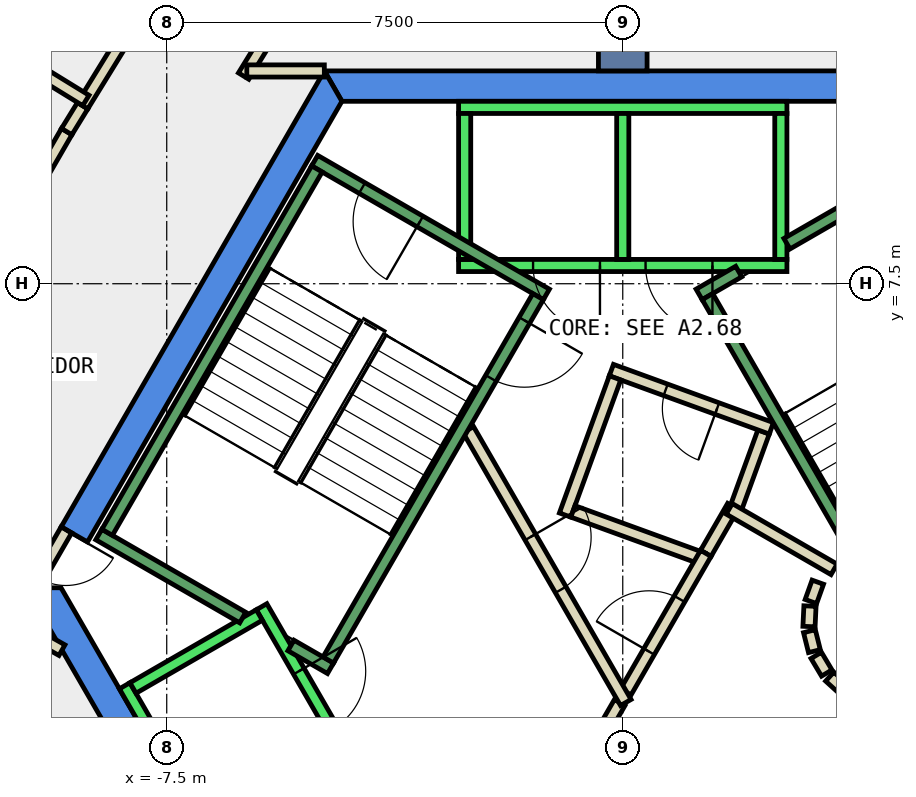
"""IFC4 building model, lengths in metres.
Left out: names, types, materials, properties, quantities, classifications, styles, units other than length and angle.
Written with IfcOpenShell. Run it as: python <this file> out.ifc"""

import sys

from ifc_helpers import new_model, si_unit, direction, frame, frame_2d, origin, place, context, subcontext, project, spatial, polyline, rectangle, outline, extrude, element, fill, save


model = new_model("IFC4")
c1 = context("Model", 3, precision=1e-05, world=origin(), true_north=direction((0.0, 1.0)))
c2 = subcontext(c1, "Body", "Model", "MODEL_VIEW")
j1 = project(units=[si_unit("LENGTHUNIT", "METRE"), si_unit("PLANEANGLEUNIT", "RADIAN")], contexts=[c1])
p1 = place(None, origin())
s1 = spatial("IfcSite", under=j1, at=p1, CompositionType="ELEMENT")
p2 = place(p1, origin())
s2 = spatial("IfcBuilding", under=s1, at=p2, CompositionType="ELEMENT")
p3 = place(p2, frame((0.0, 0.0, 322.4)))
s3 = spatial("IfcBuildingStorey", under=s2, at=p3, CompositionType="ELEMENT", Elevation=322.4)
p4 = place(p3, frame((0.0, 0.0, -0.34)))
e1 = element("IfcWall", 1, at=p4, inside=s3, PredefinedType="SHEAR", context=c2, shape_type="SweptSolid", body=[
    extrude(outline(polyline([(4.907, 11.0), (-4.907, 11.0), (-4.619, 10.5), (4.619, 10.5), (4.907, 11.0)])), origin(), (0.0, 0.0, 1.0), 3.34),
])
p5 = place(p3, frame((0.0, 0.0, -0.34)))
e2 = element("IfcWall", 2, at=p5, inside=s3, PredefinedType="SHEAR", context=c2, shape_type="SweptSolid", body=[
    extrude(outline(polyline([(-9.236, 3.502), (-8.803, 3.253), (-4.619, 10.5), (-4.907, 11.0), (-9.236, 3.502)])), origin(), (0.0, 0.0, 1.0), 3.34),
])
p6 = place(p3, frame((0.0, 0.0, -0.34)))
e3 = element("IfcWall", 3, at=p6, inside=s3, PredefinedType="SHEAR", context=c2, shape_type="SweptSolid", body=[
    extrude(outline(polyline([(-9.815, 2.5), (-4.907, -6.0), (-4.619, -5.5), (-9.238, 2.5), (-9.815, 2.5)])), origin(), (0.0, 0.0, 1.0), 3.34),
])
p7 = place(p3, frame((0.0, 11.0, -0.34), z_axis=(0.0, 0.0, 1.0), x_axis=(0.0, 1.0, 0.0)))
e4 = element("IfcWall", 4, at=p7, inside=s3, PredefinedType="SHEAR", context=c2, shape_type="SweptSolid", body=[
    extrude(rectangle(XDim=9.0, YDim=0.8, at=frame_2d((4.5, 0.0))), origin(), (0.0, 0.0, 1.0), 3.34),
])
p8 = place(p3, frame((1.366, 3.066, 0.0), z_axis=(0.0, 0.0, 1.0), x_axis=(0.499698775601, 0.866199245938, 0.0)))
e5 = element("IfcWall", 5, at=p8, inside=s3, PredefinedType="PARTITIONING", context=c2, shape_type="SweptSolid", body=[
    extrude(rectangle(XDim=0.893, YDim=0.2, at=frame_2d((0.446, 0.0))), origin(), (0.0, 0.0, 1.0), 3.0),
])
p9 = place(p3, frame((1.838, 3.748, 0.0), z_axis=(0.0, 0.0, 1.0), x_axis=(0.341883255813, 0.939742432475, 0.0)))
e6 = element("IfcWall", 6, at=p9, inside=s3, PredefinedType="PARTITIONING", context=c2, shape_type="SweptSolid", body=[
    extrude(rectangle(XDim=1.398, YDim=0.2, at=frame_2d((0.699, 0.0))), origin(), (0.0, 0.0, 1.0), 3.0),
])
p10 = place(p3, frame((2.444, 5.122, 0.0), z_axis=(0.0, 0.0, 1.0), x_axis=(-0.939650782256, 0.342135071873, 0.0)))
e7 = element("IfcWall", 7, at=p10, inside=s3, PredefinedType="PARTITIONING", context=c2, shape_type="SweptSolid", body=[
    extrude(rectangle(XDim=2.8, YDim=0.2, at=frame_2d((1.4, 0.0))), origin(), (0.0, 0.0, 1.0), 3.0),
])
p11 = place(p10, frame((0.95, 0.0, 0.0)))
e8 = element("IfcOpeningElement", 8, at=p11, cuts=e7, PredefinedType="OPENING", context=c2, shape_type="SweptSolid", body=[
    extrude(rectangle(XDim=0.9, YDim=2.1, at=frame_2d((0.45, 1.05))), frame((0.0, 0.11, 0.0), z_axis=(0.0, -1.0, 0.0), x_axis=(1.0, 0.0, 0.0)), (0.0, 0.0, 1.0), 0.22),
])
p12 = place(p3, frame((-0.127, 5.952, 0.0), z_axis=(0.0, 0.0, 1.0), x_axis=(-0.342012513308, -0.93969539785, 0.0)))
e9 = element("IfcWall", 9, at=p12, inside=s3, PredefinedType="PARTITIONING", context=c2, shape_type="SweptSolid", body=[
    extrude(rectangle(XDim=2.401, YDim=0.2, at=frame_2d((1.2, 0.0))), origin(), (0.0, 0.0, 1.0), 3.0),
])
p13 = place(p3, frame((-0.82, 3.756, 0.0), z_axis=(0.0, 0.0, 1.0), x_axis=(0.939740098492, -0.34188967122, 0.0)))
e10 = element("IfcWall", 10, at=p13, inside=s3, PredefinedType="PARTITIONING", context=c2, shape_type="SweptSolid", body=[
    extrude(rectangle(XDim=2.273, YDim=0.2, at=frame_2d((1.136, 0.0))), origin(), (0.0, 0.0, 1.0), 3.0),
])
p14 = place(p3, frame((-3.301, 15.684, 0.0), z_axis=(0.0, 0.0, 1.0), x_axis=(-0.524004979532, -0.851715199715, 0.0)))
e11 = element("IfcWall", 11, at=p14, inside=s3, PredefinedType="PARTITIONING", context=c2, shape_type="SweptSolid", body=[
    extrude(rectangle(XDim=5.599, YDim=0.2, at=frame_2d((2.8, 0.0))), origin(), (0.0, 0.0, 1.0), 3.0),
])
p15 = place(p14, frame((2.3, 0.0, 0.0)))
e12 = element("IfcOpeningElement", 12, at=p15, cuts=e11, PredefinedType="OPENING", context=c2, shape_type="SweptSolid", body=[
    extrude(rectangle(XDim=1.0, YDim=2.1, at=frame_2d((0.5, 1.05))), frame((0.0, 0.11, 0.0), z_axis=(0.0, -1.0, 0.0), x_axis=(1.0, 0.0, 0.0)), (0.0, 0.0, 1.0), 0.22),
])
p16 = place(p3, frame((-6.183, 10.999, 0.0), z_axis=(0.0, 0.0, 1.0), x_axis=(1.0, 0.0, 0.0)))
e13 = element("IfcWall", 13, at=p16, inside=s3, PredefinedType="PARTITIONING", context=c2, shape_type="SweptSolid", body=[
    extrude(rectangle(XDim=1.275, YDim=0.2, at=frame_2d((0.638, 0.0))), origin(), (0.0, 0.0, 1.0), 3.0),
])
p17 = place(p3, frame((-9.223, 1.474, 0.0), z_axis=(0.0, 0.0, 1.0), x_axis=(-0.871623785844, 0.490175454251, 0.0)))
e14 = element("IfcWall", 14, at=p17, inside=s3, PredefinedType="PARTITIONING", context=c2, shape_type="SweptSolid", body=[
    extrude(rectangle(XDim=2.297, YDim=0.2, at=frame_2d((1.148, 0.0))), origin(), (0.0, 0.0, 1.0), 3.0),
])
p18 = place(p3, frame((-11.153, 6.525, 0.0), z_axis=(0.0, 0.0, 1.0), x_axis=(0.500108414701, 0.865962801479, 0.0)))
e15 = element("IfcWall", 15, at=p18, inside=s3, PredefinedType="PARTITIONING", context=c2, shape_type="SweptSolid", body=[
    extrude(rectangle(XDim=4.015, YDim=0.2, at=frame_2d((2.008, 0.0))), origin(), (0.0, 0.0, 1.0), 3.0),
])
p19 = place(p3, frame((-9.145, 10.002, 0.0), z_axis=(0.0, 0.0, 1.0), x_axis=(0.523797791684, 0.851842634192, 0.0)))
e16 = element("IfcWall", 16, at=p19, inside=s3, PredefinedType="PARTITIONING", context=c2, shape_type="SweptSolid", body=[
    extrude(rectangle(XDim=0.5, YDim=0.2, at=frame_2d((0.25, 0.0))), origin(), (0.0, 0.0, 1.0), 3.0),
])
p20 = place(p3, frame((-8.883, 10.428, 0.0), z_axis=(0.0, 0.0, 1.0), x_axis=(0.524061371587, 0.851680502777, 0.0)))
e17 = element("IfcWall", 17, at=p20, inside=s3, PredefinedType="PARTITIONING", context=c2, shape_type="SweptSolid", body=[
    extrude(rectangle(XDim=3.4, YDim=0.2, at=frame_2d((1.7, 0.0))), origin(), (0.0, 0.0, 1.0), 3.0),
])
p21 = place(p3, frame((-0.982, -1.0, 0.0), z_axis=(0.0, 0.0, 1.0), x_axis=(0.50024047865, 0.865886518847, 0.0)))
e18 = element("IfcWall", 18, at=p21, inside=s3, PredefinedType="PARTITIONING", context=c2, shape_type="SweptSolid", body=[
    extrude(rectangle(XDim=1.863, YDim=0.2, at=frame_2d((0.931, 0.0))), origin(), (0.0, 0.0, 1.0), 3.0),
])
p22 = place(p3, frame((0.05, 0.787, 0.0), z_axis=(0.0, 0.0, 1.0), x_axis=(0.500070457302, 0.865984721421, 0.0)))
e19 = element("IfcWall", 19, at=p22, inside=s3, PredefinedType="PARTITIONING", context=c2, shape_type="SweptSolid", body=[
    extrude(rectangle(XDim=2.631, YDim=0.2, at=frame_2d((1.316, 0.0))), origin(), (0.0, 0.0, 1.0), 3.0),
])
p23 = place(p22, frame((0.766, 0.0, 0.0)))
e20 = element("IfcOpeningElement", 20, at=p23, cuts=e19, PredefinedType="OPENING", context=c2, shape_type="SweptSolid", body=[
    extrude(rectangle(XDim=1.0, YDim=2.1, at=frame_2d((0.5, 1.05))), frame((0.0, 0.11, 0.0), z_axis=(0.0, -1.0, 0.0), x_axis=(1.0, 0.0, 0.0)), (0.0, 0.0, 1.0), 0.22),
])
p24 = place(p3, frame((1.751, 3.798, 0.0), z_axis=(0.0, 0.0, 1.0), x_axis=(0.866091650241, -0.499885240213, 0.0)))
e21 = element("IfcWall", 21, at=p24, inside=s3, PredefinedType="PARTITIONING", context=c2, shape_type="SweptSolid", body=[
    extrude(rectangle(XDim=1.991, YDim=0.2, at=frame_2d((0.995, 0.0))), origin(), (0.0, 0.0, 1.0), 3.0),
])
p25 = place(p3, frame((3.208, 2.592, 0.0), z_axis=(0.0, 0.0, 1.0), x_axis=(-0.337388820924, -0.941365382578, 0.0)))
e22 = element("IfcWall", 22, at=p25, inside=s3, PredefinedType="PARTITIONING", context=c2, shape_type="SweptSolid", body=[
    extrude(rectangle(XDim=0.338, YDim=0.2, at=frame_2d((0.169, 0.0))), origin(), (0.0, 0.0, 1.0), 3.0),
])
p26 = place(p3, frame((3.079, 2.199, 0.0), z_axis=(0.0, 0.0, 1.0), x_axis=(-0.047771483479, -0.998858290933, 0.0)))
e23 = element("IfcWall", 23, at=p26, inside=s3, PredefinedType="PARTITIONING", context=c2, shape_type="SweptSolid", body=[
    extrude(rectangle(XDim=0.337, YDim=0.2, at=frame_2d((0.169, 0.0))), origin(), (0.0, 0.0, 1.0), 3.0),
])
p27 = place(p3, frame((3.07, 1.786, 0.0), z_axis=(0.0, 0.0, 1.0), x_axis=(0.242705583207, -0.970099994784, 0.0)))
e24 = element("IfcWall", 24, at=p27, inside=s3, PredefinedType="PARTITIONING", context=c2, shape_type="SweptSolid", body=[
    extrude(rectangle(XDim=0.338, YDim=0.2, at=frame_2d((0.169, 0.0))), origin(), (0.0, 0.0, 1.0), 3.0),
])
for number, where, z_axis, x_axis in (
    (25, (3.182, 1.388, 0.0), (0.0, 0.0, 1.0), (0.512, -0.859, 0.0)),
    (26, (3.404, 1.039, 0.0), (0.0, 0.0, 1.0), (0.74, -0.672, 0.0)),
):
    element("IfcWall", number, at=place(p3, frame(where, z_axis=z_axis, x_axis=x_axis)), inside=s3, PredefinedType="PARTITIONING", context=c2, shape_type="SweptSolid", body=[
        extrude(rectangle(XDim=0.338, YDim=0.2, at=frame_2d((0.169, 0.0))), origin(), (0.0, 0.0, 1.0), 3.0),
    ])
p28 = place(p3, frame((-2.54, 5.1, 0.0), z_axis=(0.0, 0.0, 1.0), x_axis=(0.499925051871, -0.866068670783, 0.0)))
e27 = element("IfcWall", 27, at=p28, inside=s3, PredefinedType="PARTITIONING", context=c2, shape_type="SweptSolid", body=[
    extrude(rectangle(XDim=5.181, YDim=0.2, at=frame_2d((2.59, 0.0))), origin(), (0.0, 0.0, 1.0), 3.0),
])
p29 = place(p28, frame((2.04, 0.0, 0.0)))
e28 = element("IfcOpeningElement", 28, at=p29, cuts=e27, PredefinedType="OPENING", context=c2, shape_type="SweptSolid", body=[
    extrude(rectangle(XDim=1.0, YDim=2.1, at=frame_2d((0.5, 1.05))), frame((0.0, 0.11, 0.0), z_axis=(0.0, -1.0, 0.0), x_axis=(1.0, 0.0, 0.0)), (0.0, 0.0, 1.0), 0.22),
])
p30 = place(p3, frame((-11.13, 11.928, 0.0), z_axis=(0.0, 0.0, 1.0), x_axis=(0.851856970107, -0.523774476737, 0.0)))
e29 = element("IfcWall", 29, at=p30, inside=s3, PredefinedType="PARTITIONING", context=c2, shape_type="SweptSolid", body=[
    extrude(rectangle(XDim=2.7, YDim=0.2, at=frame_2d((1.35, 0.0))), origin(), (0.0, 0.0, 1.0), 3.0),
])
p31 = place(p3, frame((-9.15, 3.452, 0.0), z_axis=(0.0, 0.0, 1.0), x_axis=(-0.500079945886, -0.865979242085, 0.0)))
e30 = element("IfcWall", 30, at=p31, inside=s3, PredefinedType="PARTITIONING", context=c2, shape_type="SweptSolid", body=[
    extrude(rectangle(XDim=0.926, YDim=0.2, at=frame_2d((0.463, 0.0))), origin(), (0.0, 0.0, 1.0), 2.4),
])
p32 = place(p31, frame((0.017, 0.0, 0.0)))
e31 = element("IfcOpeningElement", 31, at=p32, cuts=e30, PredefinedType="OPENING", context=c2, shape_type="SweptSolid", body=[
    extrude(rectangle(XDim=0.9, YDim=2.1, at=frame_2d((0.45, 1.05))), frame((0.0, 0.11, 0.0), z_axis=(0.0, -1.0, 0.0), x_axis=(1.0, 0.0, 0.0)), (0.0, 0.0, 1.0), 0.22),
])
p33 = place(p3, frame((2.7, 7.8, 0.0), z_axis=(0.0, 0.0, 1.0), x_axis=(-1.0, 0.0, 0.0)))
e32 = element("IfcWall", 32, at=p33, inside=s3, PredefinedType="STANDARD", context=c2, shape_type="SweptSolid", body=[
    extrude(rectangle(XDim=5.4, YDim=0.2, at=frame_2d((2.7, 0.0))), origin(), (0.0, 0.0, 1.0), 3.0),
])
p34 = place(p33, frame((1.225, 0.0, 0.0)))
e33 = element("IfcOpeningElement", 33, at=p34, cuts=e32, PredefinedType="OPENING", context=c2, shape_type="SweptSolid", body=[
    extrude(rectangle(XDim=1.1, YDim=2.1, at=frame_2d((0.55, 1.05))), frame((0.0, 0.11, 0.0), z_axis=(0.0, -1.0, 0.0), x_axis=(1.0, 0.0, 0.0)), (0.0, 0.0, 1.0), 0.22),
])
p35 = place(p33, frame((3.075, 0.0, 0.0)))
e34 = element("IfcOpeningElement", 34, at=p35, cuts=e32, PredefinedType="OPENING", context=c2, shape_type="SweptSolid", body=[
    extrude(rectangle(XDim=1.1, YDim=2.1, at=frame_2d((0.55, 1.05))), frame((0.0, 0.11, 0.0), z_axis=(0.0, -1.0, 0.0), x_axis=(1.0, 0.0, 0.0)), (0.0, 0.0, 1.0), 0.22),
])
p36 = place(p3, frame((2.7, 10.4, 0.0), z_axis=(0.0, 0.0, 1.0), x_axis=(-1.0, 0.0, 0.0)))
e35 = element("IfcWall", 35, at=p36, inside=s3, PredefinedType="STANDARD", context=c2, shape_type="SweptSolid", body=[
    extrude(rectangle(XDim=5.4, YDim=0.2, at=frame_2d((2.7, 0.0))), origin(), (0.0, 0.0, 1.0), 3.0),
])
for number, where, z_axis, x_axis in (
    (36, (2.6, 7.9, 0.0), (0.0, 0.0, 1.0), (0.0, 1.0, 0.0)),
    (37, (0.0, 7.9, 0.0), (0.0, 0.0, 1.0), (0.0, 1.0, 0.0)),
    (38, (-2.6, 7.9, 0.0), (0.0, 0.0, 1.0), (0.0, 1.0, 0.0)),
):
    element("IfcWall", number, at=place(p3, frame(where, z_axis=z_axis, x_axis=x_axis)), inside=s3, PredefinedType="STANDARD", context=c2, shape_type="SweptSolid", body=[
        extrude(rectangle(XDim=2.4, YDim=0.2, at=frame_2d((1.2, 0.0))), origin(), (0.0, 0.0, 1.0), 3.0),
    ])
p37 = place(p3, frame((-5.94, 2.188, 0.0), z_axis=(0.0, 0.0, 1.0), x_axis=(0.500034260056, -0.866005622828, 0.0)))
e39 = element("IfcWall", 39, at=p37, inside=s3, PredefinedType="STANDARD", context=c2, shape_type="SweptSolid", body=[
    extrude(rectangle(XDim=5.399, YDim=0.2, at=frame_2d((2.7, 0.0))), origin(), (0.0, 0.0, 1.0), 3.0),
])
p38 = place(p37, frame((3.075, 0.0, 0.0)))
e40 = element("IfcOpeningElement", 40, at=p38, cuts=e39, PredefinedType="OPENING", context=c2, shape_type="SweptSolid", body=[
    extrude(rectangle(XDim=1.1, YDim=2.1, at=frame_2d((0.55, 1.05))), frame((0.0, 0.11, 0.0), z_axis=(0.0, -1.0, 0.0), x_axis=(1.0, 0.0, 0.0)), (0.0, 0.0, 1.0), 0.22),
])
p39 = place(p37, frame((1.225, 0.0, 0.0)))
e41 = element("IfcOpeningElement", 41, at=p39, cuts=e39, PredefinedType="OPENING", context=c2, shape_type="SweptSolid", body=[
    extrude(rectangle(XDim=1.1, YDim=2.1, at=frame_2d((0.55, 1.05))), frame((0.0, 0.11, 0.0), z_axis=(0.0, -1.0, 0.0), x_axis=(1.0, 0.0, 0.0)), (0.0, 0.0, 1.0), 0.22),
])
p40 = place(p3, frame((-8.192, 0.888, 0.0), z_axis=(0.0, 0.0, 1.0), x_axis=(0.500034260056, -0.866005622828, 0.0)))
e42 = element("IfcWall", 42, at=p40, inside=s3, PredefinedType="STANDARD", context=c2, shape_type="SweptSolid", body=[
    extrude(rectangle(XDim=5.399, YDim=0.2, at=frame_2d((2.7, 0.0))), origin(), (0.0, 0.0, 1.0), 3.0),
])
p41 = place(p3, frame((-5.977, 2.052, 0.0), z_axis=(0.0, 0.0, 1.0), x_axis=(-0.865973769406, -0.500089422704, 0.0)))
e43 = element("IfcWall", 43, at=p41, inside=s3, PredefinedType="STANDARD", context=c2, shape_type="SweptSolid", body=[
    extrude(rectangle(XDim=2.399, YDim=0.2, at=frame_2d((1.2, 0.0))), origin(), (0.0, 0.0, 1.0), 3.0),
])
p42 = place(p3, frame((3.24, -2.488, 0.0), z_axis=(0.0, 0.0, 1.0), x_axis=(0.500034260056, 0.866005622828, 0.0)))
e44 = element("IfcWall", 44, at=p42, inside=s3, PredefinedType="STANDARD", context=c2, shape_type="SweptSolid", body=[
    extrude(rectangle(XDim=5.399, YDim=0.2, at=frame_2d((2.7, 0.0))), origin(), (0.0, 0.0, 1.0), 3.0),
])
p43 = place(p42, frame((3.225, 0.0, 0.0)))
e45 = element("IfcOpeningElement", 45, at=p43, cuts=e44, PredefinedType="OPENING", context=c2, shape_type="SweptSolid", body=[
    extrude(rectangle(XDim=1.1, YDim=2.1, at=frame_2d((0.55, 1.05))), frame((0.0, 0.11, 0.0), z_axis=(0.0, -1.0, 0.0), x_axis=(1.0, 0.0, 0.0)), (0.0, 0.0, 1.0), 0.22),
])
p44 = place(p42, frame((1.225, 0.0, 0.0)))
e46 = element("IfcOpeningElement", 46, at=p44, cuts=e44, PredefinedType="OPENING", context=c2, shape_type="SweptSolid", body=[
    extrude(rectangle(XDim=1.1, YDim=2.1, at=frame_2d((0.55, 1.05))), frame((0.0, 0.11, 0.0), z_axis=(0.0, -1.0, 0.0), x_axis=(1.0, 0.0, 0.0)), (0.0, 0.0, 1.0), 0.22),
])
p45 = place(p3, frame((2.7, 8.158, 0.0), z_axis=(0.0, 0.0, 1.0), x_axis=(0.86611865017, 0.499838457731, 0.0)))
e47 = element("IfcWall", 47, at=p45, inside=s3, PredefinedType="STANDARD", context=c2, shape_type="SweptSolid", body=[
    extrude(rectangle(XDim=2.733, YDim=0.2, at=frame_2d((1.366, 0.0))), origin(), (0.0, 0.0, 1.0), 3.0),
])
p46 = place(p3, frame((1.256, 7.324, 0.0), z_axis=(0.0, 0.0, 1.0), x_axis=(0.865915093549, 0.500191014278, 0.0)))
e48 = element("IfcWall", 48, at=p46, inside=s3, PredefinedType="STANDARD", context=c2, shape_type="SweptSolid", body=[
    extrude(rectangle(XDim=0.752, YDim=0.2, at=frame_2d((0.376, 0.0))), origin(), (0.0, 0.0, 1.0), 3.0),
])
p47 = place(p3, frame((4.843, 1.312, 0.0), z_axis=(0.0, 0.0, 1.0), x_axis=(-0.499963383562, 0.866046543262, 0.0)))
e49 = element("IfcWall", 49, at=p47, inside=s3, PredefinedType="STANDARD", context=c2, shape_type="SweptSolid", body=[
    extrude(rectangle(XDim=6.9, YDim=0.2, at=frame_2d((3.45, 0.0))), origin(), (0.0, 0.0, 1.0), 3.0),
])
p48 = place(p47, frame((0.45, 0.0, 0.0)))
e50 = element("IfcOpeningElement", 50, at=p48, cuts=e49, PredefinedType="OPENING", context=c2, shape_type="SweptSolid", body=[
    extrude(rectangle(XDim=1.1, YDim=2.2, at=frame_2d((0.55, 1.1))), frame((0.0, 0.11, 0.0), z_axis=(0.0, -1.0, 0.0), x_axis=(1.0, 0.0, 0.0)), (0.0, 0.0, 1.0), 0.22),
])
p49 = place(p3, frame((-1.256, 7.324, 0.0), z_axis=(0.0, 0.0, 1.0), x_axis=(-0.866046073146, 0.499964197906, 0.0)))
e51 = element("IfcWall", 51, at=p49, inside=s3, PredefinedType="STANDARD", context=c2, shape_type="SweptSolid", body=[
    extrude(rectangle(XDim=4.4, YDim=0.2, at=frame_2d((2.2, 0.0))), origin(), (0.0, 0.0, 1.0), 3.0),
])
p50 = place(p49, frame((2.4, 0.0, 0.0)))
e52 = element("IfcOpeningElement", 52, at=p50, cuts=e51, PredefinedType="OPENING", context=c2, shape_type="SweptSolid", body=[
    extrude(rectangle(XDim=1.1, YDim=2.2, at=frame_2d((0.55, 1.1))), frame((0.0, 0.11, 0.0), z_axis=(0.0, -1.0, 0.0), x_axis=(1.0, 0.0, 0.0)), (0.0, 0.0, 1.0), 0.22),
])
p51 = place(p3, frame((-6.25, 2.01, 0.0), z_axis=(0.0, 0.0, 1.0), x_axis=(-0.86611865017, 0.499838457731, 0.0)))
e53 = element("IfcWall", 53, at=p51, inside=s3, PredefinedType="STANDARD", context=c2, shape_type="SweptSolid", body=[
    extrude(rectangle(XDim=2.733, YDim=0.2, at=frame_2d((1.366, 0.0))), origin(), (0.0, 0.0, 1.0), 3.0),
])
p52 = place(p3, frame((-4.806, 1.176, 0.0), z_axis=(0.0, 0.0, 1.0), x_axis=(-0.866558586415, 0.499075361355, 0.0)))
e54 = element("IfcWall", 54, at=p52, inside=s3, PredefinedType="STANDARD", context=c2, shape_type="SweptSolid", body=[
    extrude(rectangle(XDim=0.751, YDim=0.2, at=frame_2d((0.376, 0.0))), origin(), (0.0, 0.0, 1.0), 3.0),
])
p53 = place(p3, frame((-1.393, 7.288, 0.0), z_axis=(0.0, 0.0, 1.0), x_axis=(-0.499963383562, -0.866046543262, 0.0)))
e55 = element("IfcWall", 55, at=p53, inside=s3, PredefinedType="STANDARD", context=c2, shape_type="SweptSolid", body=[
    extrude(rectangle(XDim=6.9, YDim=0.2, at=frame_2d((3.45, 0.0))), origin(), (0.0, 0.0, 1.0), 3.0),
])
p54 = place(p53, frame((0.45, 0.0, 0.0)))
e56 = element("IfcOpeningElement", 56, at=p54, cuts=e55, PredefinedType="OPENING", context=c2, shape_type="SweptSolid", body=[
    extrude(rectangle(XDim=1.1, YDim=2.2, at=frame_2d((0.55, 1.1))), frame((0.0, 0.11, 0.0), z_axis=(0.0, -1.0, 0.0), x_axis=(1.0, 0.0, 0.0)), (0.0, 0.0, 1.0), 0.22),
])
p55 = place(p3, frame((-5.03, 9.388, 0.0), z_axis=(0.0, 0.0, 1.0), x_axis=(-0.499978703459, -0.866037698999, 0.0)))
e57 = element("IfcWall", 57, at=p55, inside=s3, PredefinedType="STANDARD", context=c2, shape_type="SweptSolid", body=[
    extrude(rectangle(XDim=6.9, YDim=0.2, at=frame_2d((3.45, 0.0))), origin(), (0.0, 0.0, 1.0), 3.0),
])
p56 = place(p23, origin())
e58 = element("IfcDoor", 58, at=p56, inside=s3, OperationType="SINGLE_SWING_RIGHT", PredefinedType="DOOR", context=c2, shape_type="SweptSolid", body=[
    extrude(rectangle(XDim=1.0, YDim=2.1, at=frame_2d((0.5, 1.05))), frame((0.0, 0.025, 0.0), z_axis=(0.0, -1.0, 0.0), x_axis=(1.0, 0.0, 0.0)), (0.0, 0.0, 1.0), 0.05),
])
fill(e20, e58)
p57 = place(p29, origin())
e59 = element("IfcDoor", 59, at=p57, inside=s3, OperationType="SINGLE_SWING_RIGHT", PredefinedType="DOOR", context=c2, shape_type="SweptSolid", body=[
    extrude(rectangle(XDim=1.0, YDim=2.1, at=frame_2d((0.5, 1.05))), frame((0.0, 0.025, 0.0), z_axis=(0.0, -1.0, 0.0), x_axis=(1.0, 0.0, 0.0)), (0.0, 0.0, 1.0), 0.05),
])
fill(e28, e59)
p58 = place(p11, origin())
e60 = element("IfcDoor", 60, at=p58, inside=s3, OperationType="SINGLE_SWING_LEFT", PredefinedType="DOOR", context=c2, shape_type="SweptSolid", body=[
    extrude(rectangle(XDim=0.9, YDim=2.1, at=frame_2d((0.45, 1.05))), frame((0.0, 0.025, 0.0), z_axis=(0.0, -1.0, 0.0), x_axis=(1.0, 0.0, 0.0)), (0.0, 0.0, 1.0), 0.05),
])
fill(e8, e60)
p59 = place(p32, origin())
e61 = element("IfcDoor", 61, at=p59, inside=s3, OperationType="SINGLE_SWING_LEFT", PredefinedType="DOOR", context=c2, shape_type="SweptSolid", body=[
    extrude(rectangle(XDim=0.9, YDim=2.1, at=frame_2d((0.45, 1.05))), frame((0.0, 0.025, 0.0), z_axis=(0.0, -1.0, 0.0), x_axis=(1.0, 0.0, 0.0)), (0.0, 0.0, 1.0), 0.05),
])
fill(e31, e61)
p60 = place(p34, origin())
e62 = element("IfcDoor", 62, at=p60, inside=s3, OperationType="SLIDING_TO_LEFT", PredefinedType="DOOR", context=c2, shape_type="SweptSolid", body=[
    extrude(rectangle(XDim=1.1, YDim=2.1, at=frame_2d((0.55, 1.05))), frame((0.0, 0.025, 0.0), z_axis=(0.0, -1.0, 0.0), x_axis=(1.0, 0.0, 0.0)), (0.0, 0.0, 1.0), 0.05),
])
fill(e33, e62)
p61 = place(p35, origin())
e63 = element("IfcDoor", 63, at=p61, inside=s3, OperationType="SLIDING_TO_LEFT", PredefinedType="DOOR", context=c2, shape_type="SweptSolid", body=[
    extrude(rectangle(XDim=1.1, YDim=2.1, at=frame_2d((0.55, 1.05))), frame((0.0, 0.025, 0.0), z_axis=(0.0, -1.0, 0.0), x_axis=(1.0, 0.0, 0.0)), (0.0, 0.0, 1.0), 0.05),
])
fill(e34, e63)
p62 = place(p39, origin())
e64 = element("IfcDoor", 64, at=p62, inside=s3, OperationType="SLIDING_TO_LEFT", PredefinedType="DOOR", context=c2, shape_type="SweptSolid", body=[
    extrude(rectangle(XDim=1.1, YDim=2.1, at=frame_2d((0.55, 1.05))), frame((0.0, 0.025, 0.0), z_axis=(0.0, -1.0, 0.0), x_axis=(1.0, 0.0, 0.0)), (0.0, 0.0, 1.0), 0.05),
])
fill(e41, e64)
p63 = place(p54, origin())
e65 = element("IfcDoor", 65, at=p63, inside=s3, OperationType="SINGLE_SWING_LEFT", PredefinedType="DOOR", context=c2, shape_type="SweptSolid", body=[
    extrude(rectangle(XDim=1.1, YDim=2.2, at=frame_2d((0.55, 1.1))), frame((0.0, 0.025, 0.0), z_axis=(0.0, -1.0, 0.0), x_axis=(1.0, 0.0, 0.0)), (0.0, 0.0, 1.0), 0.05),
])
fill(e56, e65)
p64 = place(p50, origin())
e66 = element("IfcDoor", 66, at=p64, inside=s3, OperationType="SINGLE_SWING_LEFT", PredefinedType="DOOR", context=c2, shape_type="SweptSolid", body=[
    extrude(rectangle(XDim=1.1, YDim=2.2, at=frame_2d((0.55, 1.1))), frame((0.0, 0.025, 0.0), z_axis=(0.0, -1.0, 0.0), x_axis=(1.0, 0.0, 0.0)), (0.0, 0.0, 1.0), 0.05),
])
fill(e52, e66)
save(model, sys.argv[1])
